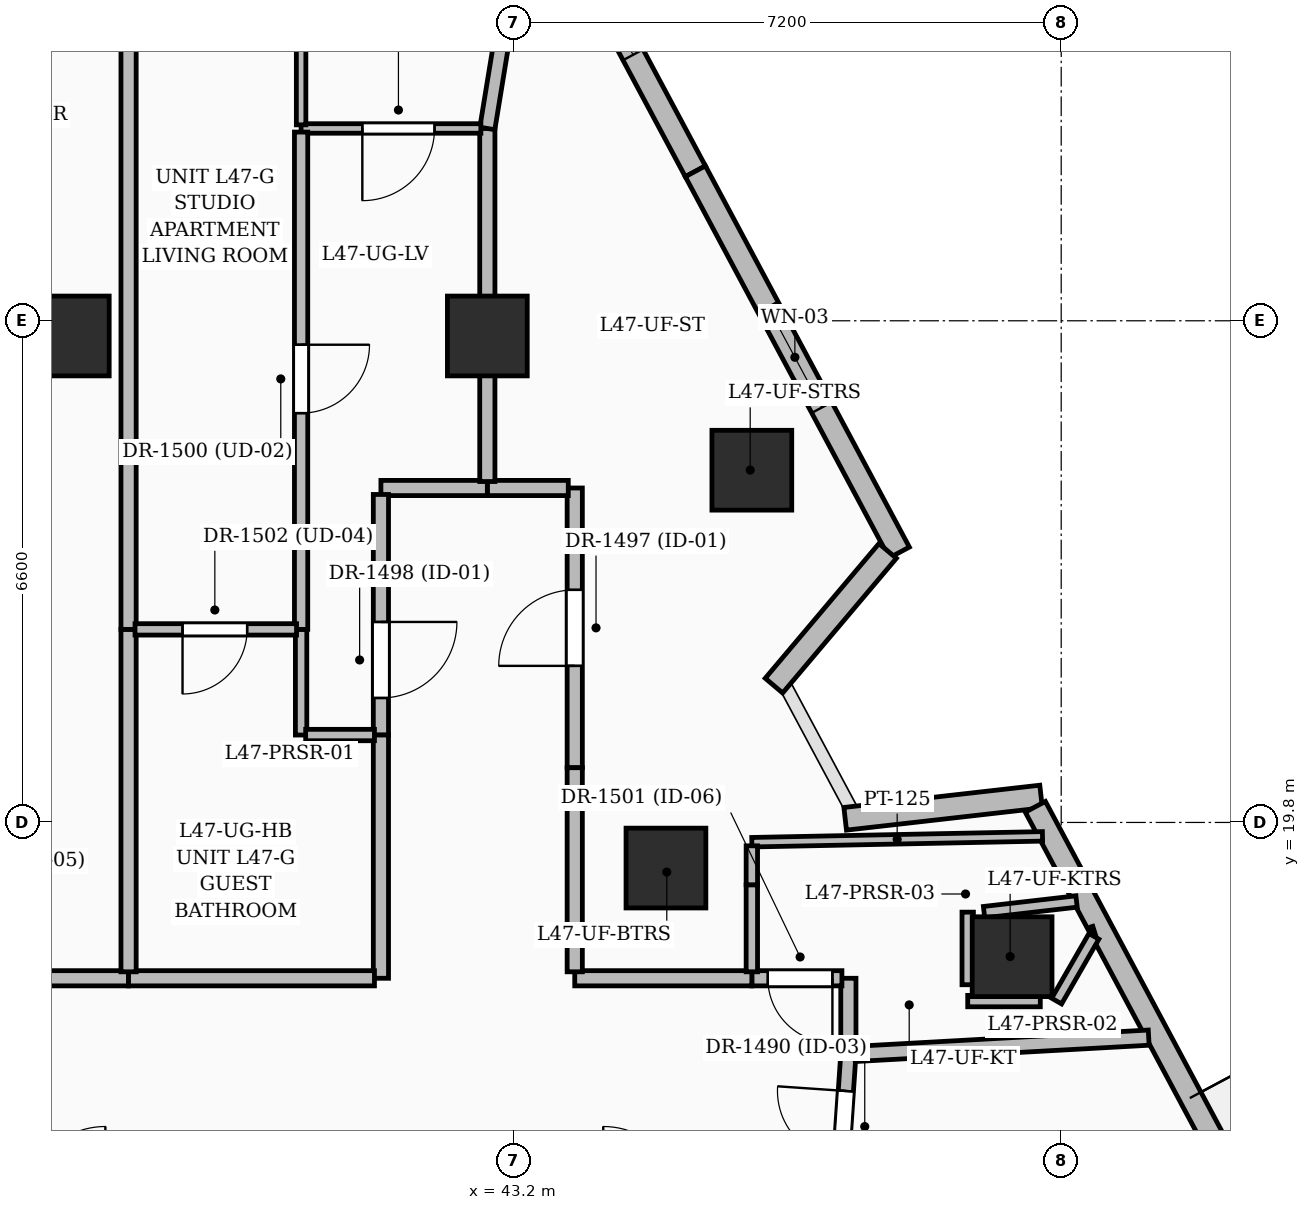
"""IFC4 building model, lengths in metres.
Left out: names, types, materials, properties, quantities, classifications, styles, units other than length and angle.
Written with IfcOpenShell. Run it as: python <this file> out.ifc"""

import sys

from ifc_helpers import new_model, si_unit, direction, frame, frame_2d, origin, origin_2d, place, context, subcontext, project, spatial, rectangle, extrude, element, fill, save


model = new_model("IFC4")
c1 = context("Model", 3, precision=1e-05, world=origin(), true_north=direction((0.0, 1.0)))
c2 = subcontext(c1, "Body", "Model", "MODEL_VIEW")
j1 = project(units=[si_unit("LENGTHUNIT", "METRE"), si_unit("PLANEANGLEUNIT", "RADIAN")], contexts=[c1])
p1 = place(None, origin())
s1 = spatial("IfcSite", under=j1, at=p1, CompositionType="ELEMENT")
p2 = place(p1, origin())
s2 = spatial("IfcBuilding", under=s1, at=p2, CompositionType="ELEMENT")
p3 = place(p2, frame((0.0, 0.0, 182.4)))
s3 = spatial("IfcBuildingStorey", under=s2, at=p3, CompositionType="ELEMENT", Elevation=182.4)
for number, where, z_axis, x_axis in (
    (1, (45.2, 19.2, 0.0), (0.0, 0.0, 1.0), (1.0, 0.0, 0.0)),
    (2, (42.85, 26.2, 0.0), (0.0, 0.0, 1.0), (1.0, 0.0, 0.0)),
    (3, (37.35, 26.2, 0.0), (0.0, 0.0, 1.0), (1.0, 0.0, 0.0)),
    (4, (49.754, 18.034, 0.0), (0.0, 0.0, 1.0), (1.0, 0.0, 0.0)),
    (5, (46.33, 24.434, 0.0), (0.0, 0.0, 1.0), (1.0, 0.0, 0.0)),
):
    element("IfcColumn", number, at=place(p3, frame(where, z_axis=z_axis, x_axis=x_axis)), inside=s3, PredefinedType="COLUMN", context=c2, shape_type="SweptSolid", body=[
        extrude(rectangle(XDim=1.05, YDim=1.05, at=origin_2d()), origin(), (0.0, 0.0, 1.0), 3.6),
    ])
p4 = place(p3, frame((42.904, 33.382, 0.0), z_axis=(0.0, 0.0, 1.0), x_axis=(0.4716995968, -0.881759315448, 0.0)))
e6 = element("IfcWall", 6, at=p4, inside=s3, PredefinedType="SOLIDWALL", context=c2, shape_type="SweptSolid", body=[
    extrude(rectangle(XDim=5.688, YDim=0.3, at=frame_2d((2.844, 0.0))), origin(), (0.0, 0.0, 1.0), 3.35),
])
p5 = place(p4, frame((2.35, 0.0, 0.55)))
e7 = element("IfcOpeningElement", 7, at=p5, cuts=e6, PredefinedType="OPENING", context=c2, shape_type="SweptSolid", body=[
    extrude(rectangle(XDim=1.6, YDim=2.2, at=frame_2d((0.8, 1.1))), frame((0.0, 0.16, 0.0), z_axis=(0.0, -1.0, 0.0), x_axis=(1.0, 0.0, 0.0)), (0.0, 0.0, 1.0), 0.32),
])
p6 = place(p3, frame((45.587, 28.366, 0.0), z_axis=(0.0, 0.0, 1.0), x_axis=(0.471750824323, -0.881731909228, 0.0)))
e8 = element("IfcWall", 8, at=p6, inside=s3, PredefinedType="SOLIDWALL", context=c2, shape_type="SweptSolid", body=[
    extrude(rectangle(XDim=5.688, YDim=0.3, at=frame_2d((2.844, 0.0))), origin(), (0.0, 0.0, 1.0), 3.35),
])
p7 = place(p6, frame((2.025, 0.0, 0.6)))
e9 = element("IfcOpeningElement", 9, at=p7, cuts=e8, PredefinedType="OPENING", context=c2, shape_type="SweptSolid", body=[
    extrude(rectangle(XDim=1.5, YDim=2.1, at=frame_2d((0.75, 1.05))), frame((0.0, 0.16, 0.0), z_axis=(0.0, -1.0, 0.0), x_axis=(1.0, 0.0, 0.0)), (0.0, 0.0, 1.0), 0.32),
])
p8 = place(p3, frame((48.117, 23.372, 0.0), z_axis=(0.0, 0.0, 1.0), x_axis=(-0.645234076177, -0.763984938949, 0.0)))
e10 = element("IfcWall", 10, at=p8, inside=s3, PredefinedType="SOLIDWALL", context=c2, shape_type="SweptSolid", body=[
    extrude(rectangle(XDim=2.319, YDim=0.3, at=frame_2d((1.16, 0.0))), origin(), (0.0, 0.0, 1.0), 2.575),
])
p9 = place(p3, frame((47.558, 19.848, 0.0), z_axis=(0.0, 0.0, 1.0), x_axis=(0.993611013473, 0.112859000109, 0.0)))
e11 = element("IfcWall", 11, at=p9, inside=s3, PredefinedType="SOLIDWALL", context=c2, shape_type="SweptSolid", body=[
    extrude(rectangle(XDim=2.594, YDim=0.3, at=frame_2d((1.297, 0.0))), origin(), (0.0, 0.0, 1.0), 2.575),
])
p10 = place(p3, frame((50.06, 20.006, 0.0), z_axis=(0.0, 0.0, 1.0), x_axis=(0.471725656125, -0.881745374444, 0.0)))
e12 = element("IfcWall", 12, at=p10, inside=s3, PredefinedType="SOLIDWALL", context=c2, shape_type="SweptSolid", body=[
    extrude(rectangle(XDim=5.413, YDim=0.3, at=frame_2d((2.706, 0.0))), origin(), (0.0, 0.0, 1.0), 3.35),
])
p11 = place(p3, frame((47.425, 14.2, 0.0), z_axis=(0.0, 0.0, 1.0), x_axis=(0.068484119878, 0.997652206595, 0.0)))
e13 = element("IfcWall", 13, at=p11, inside=s3, PredefinedType="PARTITIONING", context=c2, shape_type="SweptSolid", body=[
    extrude(rectangle(XDim=2.556, YDim=0.2, at=frame_2d((1.278, 0.0))), origin(), (0.0, 0.0, 1.0), 2.464),
])
p12 = place(p11, frame((1.172, 0.0, 0.0)))
e14 = element("IfcOpeningElement", 14, at=p12, cuts=e13, PredefinedType="OPENING", context=c2, shape_type="SweptSolid", body=[
    extrude(rectangle(XDim=0.9, YDim=2.1, at=frame_2d((0.45, 1.05))), frame((0.0, 0.11, 0.0), z_axis=(0.0, -1.0, 0.0), x_axis=(1.0, 0.0, 0.0)), (0.0, 0.0, 1.0), 0.22),
])
p13 = place(p3, frame((38.13, 17.75, 0.0), z_axis=(0.0, 0.0, 1.0), x_axis=(-1.0, 0.0, 0.0)))
e15 = element("IfcWall", 15, at=p13, inside=s3, PredefinedType="PARTITIONING", context=c2, shape_type="SweptSolid", body=[
    extrude(rectangle(XDim=4.73, YDim=0.2, at=frame_2d((2.365, 0.0))), origin(), (0.0, 0.0, 1.0), 2.436),
])
p14 = place(p13, frame((1.565, 0.0, 0.0)))
e16 = element("IfcOpeningElement", 16, at=p14, cuts=e15, PredefinedType="OPENING", context=c2, shape_type="SweptSolid", body=[
    extrude(rectangle(XDim=1.6, YDim=2.3, at=frame_2d((0.8, 1.15))), frame((0.0, 0.11, 0.0), z_axis=(0.0, -1.0, 0.0), x_axis=(1.0, 0.0, 0.0)), (0.0, 0.0, 1.0), 0.22),
])
p15 = place(p3, frame((44.0, 20.52, 0.0), z_axis=(0.0, 0.0, 1.0), x_axis=(0.0, 1.0, 0.0)))
e17 = element("IfcWall", 17, at=p15, inside=s3, PredefinedType="PARTITIONING", context=c2, shape_type="SweptSolid", body=[
    extrude(rectangle(XDim=3.68, YDim=0.2, at=frame_2d((1.84, 0.0))), origin(), (0.0, 0.0, 1.0), 2.436),
])
p16 = place(p15, frame((1.34, 0.0, 0.0)))
e18 = element("IfcOpeningElement", 18, at=p16, cuts=e17, PredefinedType="OPENING", context=c2, shape_type="SweptSolid", body=[
    extrude(rectangle(XDim=1.0, YDim=2.2, at=frame_2d((0.5, 1.1))), frame((0.0, 0.11, 0.0), z_axis=(0.0, -1.0, 0.0), x_axis=(1.0, 0.0, 0.0)), (0.0, 0.0, 1.0), 0.22),
])
p17 = place(p3, frame((43.915, 24.2, 0.0), z_axis=(0.0, 0.0, 1.0), x_axis=(-1.0, 0.0, 0.0)))
e19 = element("IfcWall", 19, at=p17, inside=s3, PredefinedType="PARTITIONING", context=c2, shape_type="SweptSolid", body=[
    extrude(rectangle(XDim=1.065, YDim=0.2, at=frame_2d((0.532, 0.0))), origin(), (0.0, 0.0, 1.0), 2.436),
])
p18 = place(p3, frame((47.6, 16.75, 0.0), z_axis=(0.0, 0.0, 1.0), x_axis=(0.0, 1.0, 0.0)))
e20 = element("IfcWall", 20, at=p18, inside=s3, PredefinedType="PARTITIONING", context=c2, shape_type="SweptSolid", body=[
    extrude(rectangle(XDim=1.0, YDim=0.2, at=frame_2d((0.5, 0.0))), origin(), (0.0, 0.0, 1.0), 3.01),
])
p19 = place(p3, frame((47.515, 17.75, 0.0), z_axis=(0.0, 0.0, 1.0), x_axis=(-1.0, 0.0, 0.0)))
e21 = element("IfcWall", 21, at=p19, inside=s3, PredefinedType="PARTITIONING", context=c2, shape_type="SweptSolid", body=[
    extrude(rectangle(XDim=1.185, YDim=0.2, at=frame_2d((0.592, 0.0))), origin(), (0.0, 0.0, 1.0), 3.01),
])
p20 = place(p19, frame((0.125, 0.0, 0.0)))
e22 = element("IfcOpeningElement", 22, at=p20, cuts=e21, PredefinedType="OPENING", context=c2, shape_type="SweptSolid", body=[
    extrude(rectangle(XDim=0.85, YDim=2.1, at=frame_2d((0.425, 1.05))), frame((0.0, 0.11, 0.0), z_axis=(0.0, -1.0, 0.0), x_axis=(1.0, 0.0, 0.0)), (0.0, 0.0, 1.0), 0.22),
])
p21 = place(p3, frame((46.33, 17.75, 0.0), z_axis=(0.0, 0.0, 1.0), x_axis=(-1.0, 0.0, 0.0)))
e23 = element("IfcWall", 23, at=p21, inside=s3, PredefinedType="PARTITIONING", context=c2, shape_type="SweptSolid", body=[
    extrude(rectangle(XDim=2.33, YDim=0.2, at=frame_2d((1.165, 0.0))), origin(), (0.0, 0.0, 1.0), 2.436),
])
p22 = place(p3, frame((42.85, 24.2, 0.0), z_axis=(0.0, 0.0, 1.0), x_axis=(-1.0, 0.0, 0.0)))
e24 = element("IfcWall", 24, at=p22, inside=s3, PredefinedType="PARTITIONING", context=c2, shape_type="SweptSolid", body=[
    extrude(rectangle(XDim=1.4, YDim=0.2, at=frame_2d((0.7, 0.0))), origin(), (0.0, 0.0, 1.0), 3.35),
])
p23 = place(p3, frame((41.45, 24.115, 0.0), z_axis=(0.0, 0.0, 1.0), x_axis=(0.0, -1.0, 0.0)))
e25 = element("IfcWall", 25, at=p23, inside=s3, PredefinedType="PARTITIONING", context=c2, shape_type="SweptSolid", body=[
    extrude(rectangle(XDim=3.165, YDim=0.2, at=frame_2d((1.583, 0.0))), origin(), (0.0, 0.0, 1.0), 3.35),
])
p24 = place(p23, frame((1.677, 0.0, 0.0)))
e26 = element("IfcOpeningElement", 26, at=p24, cuts=e25, PredefinedType="OPENING", context=c2, shape_type="SweptSolid", body=[
    extrude(rectangle(XDim=1.0, YDim=2.2, at=frame_2d((0.5, 1.1))), frame((0.0, 0.11, 0.0), z_axis=(0.0, -1.0, 0.0), x_axis=(1.0, 0.0, 0.0)), (0.0, 0.0, 1.0), 0.22),
])
p25 = place(p3, frame((41.45, 20.95, 0.0), z_axis=(0.0, 0.0, 1.0), x_axis=(0.0, -1.0, 0.0)))
e27 = element("IfcWall", 27, at=p25, inside=s3, PredefinedType="PARTITIONING", context=c2, shape_type="SweptSolid", body=[
    extrude(rectangle(XDim=3.2, YDim=0.2, at=frame_2d((1.6, 0.0))), origin(), (0.0, 0.0, 1.0), 3.35),
])
p26 = place(p3, frame((41.365, 17.75, 0.0), z_axis=(0.0, 0.0, 1.0), x_axis=(-1.0, 0.0, 0.0)))
e28 = element("IfcWall", 28, at=p26, inside=s3, PredefinedType="PARTITIONING", context=c2, shape_type="SweptSolid", body=[
    extrude(rectangle(XDim=3.235, YDim=0.2, at=frame_2d((1.618, 0.0))), origin(), (0.0, 0.0, 1.0), 3.35),
])
p27 = place(p3, frame((51.551, 16.969, 0.0), z_axis=(0.0, 0.0, 1.0), x_axis=(-0.998463068017, -0.055421131396, 0.0)))
e29 = element("IfcWall", 29, at=p27, inside=s3, PredefinedType="PARTITIONING", context=c2, shape_type="SweptSolid", body=[
    extrude(rectangle(XDim=3.872, YDim=0.2, at=frame_2d((1.936, 0.0))), origin(), (0.0, 0.0, 1.0), 2.464),
])
p28 = place(p3, frame((38.13, 17.835, 0.0), z_axis=(0.0, 0.0, 1.0), x_axis=(0.0, 1.0, 0.0)))
e30 = element("IfcWall", 30, at=p28, inside=s3, PredefinedType="PARTITIONING", context=c2, shape_type="SweptSolid", body=[
    extrude(rectangle(XDim=4.505, YDim=0.2, at=frame_2d((2.252, 0.0))), origin(), (0.0, 0.0, 1.0), 3.35),
])
p29 = place(p3, frame((38.13, 22.34, 0.0), z_axis=(0.0, 0.0, 1.0), x_axis=(0.0, 1.0, 0.0)))
e31 = element("IfcWall", 31, at=p29, inside=s3, PredefinedType="PARTITIONING", context=c2, shape_type="SweptSolid", body=[
    extrude(rectangle(XDim=11.59, YDim=0.2, at=frame_2d((5.795, 0.0))), origin(), (0.0, 0.0, 1.0), 2.436),
])
p30 = place(p3, frame((46.33, 19.54, 0.0), z_axis=(0.0, 0.0, 1.0), x_axis=(0.999797833356, 0.020107024038, 0.0)))
e32 = element("IfcWall", 32, at=p30, inside=s3, PredefinedType="PARTITIONING", context=c2, shape_type="SweptSolid", body=[
    extrude(rectangle(XDim=3.825, YDim=0.125, at=frame_2d((1.912, 0.0))), origin(), (0.0, 0.0, 1.0), 2.57),
])
p31 = place(p3, frame((42.85, 28.93, 0.0), z_axis=(0.0, 0.0, 1.0), x_axis=(0.0, -1.0, 0.0)))
e33 = element("IfcWall", 33, at=p31, inside=s3, PredefinedType="PARTITIONING", context=c2, shape_type="SweptSolid", body=[
    extrude(rectangle(XDim=4.645, YDim=0.2, at=frame_2d((2.323, 0.0))), origin(), (0.0, 0.0, 1.0), 2.436),
])
p32 = place(p3, frame((43.382, 32.181, 0.0), z_axis=(0.0, 0.0, 1.0), x_axis=(-0.161489880459, -0.986874368149, 0.0)))
e34 = element("IfcWall", 34, at=p32, inside=s3, PredefinedType="PARTITIONING", context=c2, shape_type="SweptSolid", body=[
    extrude(rectangle(XDim=3.294, YDim=0.2, at=frame_2d((1.647, 0.0))), origin(), (0.0, 0.0, 1.0), 2.57),
])
p33 = place(p3, frame((46.33, 18.98, 0.0), z_axis=(0.0, 0.0, 1.0), x_axis=(0.0, -1.0, 0.0)))
e35 = element("IfcWall", 35, at=p33, inside=s3, PredefinedType="PARTITIONING", context=c2, shape_type="SweptSolid", body=[
    extrude(rectangle(XDim=1.145, YDim=0.15, at=frame_2d((0.573, 0.0))), origin(), (0.0, 0.0, 1.0), 3.01),
])
p34 = place(p3, frame((40.4, 22.34, 0.0), z_axis=(0.0, 0.0, 1.0), x_axis=(0.0, -1.0, 0.0)))
e36 = element("IfcWall", 36, at=p34, inside=s3, PredefinedType="PARTITIONING", context=c2, shape_type="SweptSolid", body=[
    extrude(rectangle(XDim=1.39, YDim=0.15, at=frame_2d((0.695, 0.0))), origin(), (0.0, 0.0, 1.0), 3.35),
])
p35 = place(p3, frame((40.46, 20.95, 0.0), z_axis=(0.0, 0.0, 1.0), x_axis=(1.0, 0.0, 0.0)))
e37 = element("IfcWall", 37, at=p35, inside=s3, PredefinedType="PARTITIONING", context=c2, shape_type="SweptSolid", body=[
    extrude(rectangle(XDim=0.905, YDim=0.15, at=frame_2d((0.453, 0.0))), origin(), (0.0, 0.0, 1.0), 3.35),
])
p36 = place(p3, frame((42.765, 28.93, 0.0), z_axis=(0.0, 0.0, 1.0), x_axis=(-1.0, 0.0, 0.0)))
e38 = element("IfcWall", 38, at=p36, inside=s3, PredefinedType="PARTITIONING", context=c2, shape_type="SweptSolid", body=[
    extrude(rectangle(XDim=2.365, YDim=0.125, at=frame_2d((1.183, 0.0))), origin(), (0.0, 0.0, 1.0), 2.464),
])
p37 = place(p36, frame((0.61, 0.0, 0.0)))
e39 = element("IfcOpeningElement", 39, at=p37, cuts=e38, PredefinedType="OPENING", context=c2, shape_type="SweptSolid", body=[
    extrude(rectangle(XDim=0.95, YDim=2.2, at=frame_2d((0.475, 1.1))), frame((0.0, 0.072, 0.0), z_axis=(0.0, -1.0, 0.0), x_axis=(1.0, 0.0, 0.0)), (0.0, 0.0, 1.0), 0.145),
])
p38 = place(p3, frame((40.4, 28.883, 0.0), z_axis=(0.0, 0.0, 1.0), x_axis=(0.0, -1.0, 0.0)))
e40 = element("IfcWall", 40, at=p38, inside=s3, PredefinedType="PARTITIONING", context=c2, shape_type="SweptSolid", body=[
    extrude(rectangle(XDim=6.542, YDim=0.175, at=frame_2d((3.271, 0.0))), origin(), (0.0, 0.0, 1.0), 2.436),
])
p39 = place(p38, frame((2.798, 0.0, 0.0)))
e41 = element("IfcOpeningElement", 41, at=p39, cuts=e40, PredefinedType="OPENING", context=c2, shape_type="SweptSolid", body=[
    extrude(rectangle(XDim=0.9, YDim=2.15, at=frame_2d((0.45, 1.075))), frame((0.0, 0.097, 0.0), z_axis=(0.0, -1.0, 0.0), x_axis=(1.0, 0.0, 0.0)), (0.0, 0.0, 1.0), 0.195),
])
p40 = place(p3, frame((40.34, 22.34, 0.0), z_axis=(0.0, 0.0, 1.0), x_axis=(-1.0, 0.0, 0.0)))
e42 = element("IfcWall", 42, at=p40, inside=s3, PredefinedType="PARTITIONING", context=c2, shape_type="SweptSolid", body=[
    extrude(rectangle(XDim=2.125, YDim=0.15, at=frame_2d((1.062, 0.0))), origin(), (0.0, 0.0, 1.0), 3.35),
])
p41 = place(p40, frame((0.65, 0.0, 0.0)))
e43 = element("IfcOpeningElement", 43, at=p41, cuts=e42, PredefinedType="OPENING", context=c2, shape_type="SweptSolid", body=[
    extrude(rectangle(XDim=0.85, YDim=2.1, at=frame_2d((0.425, 1.05))), frame((0.0, 0.085, 0.0), z_axis=(0.0, -1.0, 0.0), x_axis=(1.0, 0.0, 0.0)), (0.0, 0.0, 1.0), 0.17),
])
p42 = place(p3, frame((40.4, 33.883, 0.0), z_axis=(0.0, 0.0, 1.0), x_axis=(0.0, -1.0, 0.0)))
e44 = element("IfcWall", 44, at=p42, inside=s3, PredefinedType="PARTITIONING", context=c2, shape_type="SweptSolid", body=[
    extrude(rectangle(XDim=4.905, YDim=0.125, at=frame_2d((2.453, 0.0))), origin(), (0.0, 0.0, 1.0), 2.57),
])
p43 = place(p3, frame((44.0, 17.835, 0.0), z_axis=(0.0, 0.0, 1.0), x_axis=(0.0, 1.0, 0.0)))
e45 = element("IfcWall", 45, at=p43, inside=s3, PredefinedType="PARTITIONING", context=c2, shape_type="SweptSolid", body=[
    extrude(rectangle(XDim=2.685, YDim=0.2, at=frame_2d((1.343, 0.0))), origin(), (0.0, 0.0, 1.0), 3.35),
])
p44 = place(p3, frame((50.838, 18.362, 0.0), z_axis=(0.0, 0.0, 1.0), x_axis=(-0.95112480189, -0.30880675386, 0.0)))
e46 = element("IfcWall", 46, at=p44, inside=s3, PredefinedType="PARTITIONING", context=c2, shape_type="SweptSolid", body=[
    extrude(rectangle(XDim=0.02, YDim=0.15, at=frame_2d((0.01, 0.0))), origin(), (0.0, 0.0, 1.0), 3.35),
])
p45 = place(p3, frame((50.83, 18.302, 0.0), z_axis=(0.0, 0.0, 1.0), x_axis=(-0.498517791367, -0.866879467798, 0.0)))
e47 = element("IfcWall", 47, at=p45, inside=s3, PredefinedType="PARTITIONING", context=c2, shape_type="SweptSolid", body=[
    extrude(rectangle(XDim=0.983, YDim=0.15, at=frame_2d((0.491, 0.0))), origin(), (0.0, 0.0, 1.0), 2.57),
])
for number, where, z_axis, x_axis in (
    (48, (50.125, 17.45, 0.0), (0.0, 0.0, 1.0), (-1.0, 0.0, 0.0)),
    (49, (49.17, 17.665, 0.0), (0.0, 0.0, 1.0), (0.0, 1.0, 0.0)),
):
    element("IfcWall", number, at=place(p3, frame(where, z_axis=z_axis, x_axis=x_axis)), inside=s3, PredefinedType="PARTITIONING", context=c2, shape_type="SweptSolid", body=[
        extrude(rectangle(XDim=0.955, YDim=0.15, at=frame_2d((0.478, 0.0))), origin(), (0.0, 0.0, 1.0), 2.464),
    ])
p46 = place(p3, frame((49.385, 18.62, 0.0), z_axis=(0.0, 0.0, 1.0), x_axis=(0.993458591967, 0.11419293344, 0.0)))
e50 = element("IfcWall", 50, at=p46, inside=s3, PredefinedType="PARTITIONING", context=c2, shape_type="SweptSolid", body=[
    extrude(rectangle(XDim=1.225, YDim=0.15, at=frame_2d((0.613, 0.0))), origin(), (0.0, 0.0, 1.0), 2.57),
])
p47 = place(p3, frame((46.33, 19.492, 0.0), z_axis=(0.0, 0.0, 1.0), x_axis=(0.0, -1.0, 0.0)))
e51 = element("IfcWall", 51, at=p47, inside=s3, PredefinedType="PARTITIONING", context=c2, shape_type="SweptSolid", body=[
    extrude(rectangle(XDim=0.512, YDim=0.15, at=frame_2d((0.256, 0.0))), origin(), (0.0, 0.0, 1.0), 3.01),
])
p48 = place(p5, origin())
e52 = element("IfcWindow", 52, at=p48, inside=s3, PartitioningType="SINGLE_PANEL", PredefinedType="WINDOW", context=c2, shape_type="SweptSolid", body=[
    extrude(rectangle(XDim=1.6, YDim=2.2, at=frame_2d((0.8, 1.1))), frame((0.0, 0.03, 0.0), z_axis=(0.0, -1.0, 0.0), x_axis=(1.0, 0.0, 0.0)), (0.0, 0.0, 1.0), 0.06),
])
fill(e7, e52)
p49 = place(p7, origin())
e53 = element("IfcWindow", 53, at=p49, inside=s3, PartitioningType="SINGLE_PANEL", PredefinedType="WINDOW", context=c2, shape_type="SweptSolid", body=[
    extrude(rectangle(XDim=1.5, YDim=2.1, at=frame_2d((0.75, 1.05))), frame((0.0, 0.03, 0.0), z_axis=(0.0, -1.0, 0.0), x_axis=(1.0, 0.0, 0.0)), (0.0, 0.0, 1.0), 0.06),
])
fill(e9, e53)
p50 = place(p12, origin())
e54 = element("IfcDoor", 54, at=p50, inside=s3, OperationType="SINGLE_SWING_RIGHT", PredefinedType="DOOR", context=c2, shape_type="SweptSolid", body=[
    extrude(rectangle(XDim=0.9, YDim=2.1, at=frame_2d((0.45, 1.05))), frame((0.0, 0.025, 0.0), z_axis=(0.0, -1.0, 0.0), x_axis=(1.0, 0.0, 0.0)), (0.0, 0.0, 1.0), 0.05),
])
fill(e14, e54)
p51 = place(p16, origin())
e55 = element("IfcDoor", 55, at=p51, inside=s3, OperationType="SINGLE_SWING_LEFT", PredefinedType="DOOR", context=c2, shape_type="SweptSolid", body=[
    extrude(rectangle(XDim=1.0, YDim=2.2, at=frame_2d((0.5, 1.1))), frame((0.0, 0.025, 0.0), z_axis=(0.0, -1.0, 0.0), x_axis=(1.0, 0.0, 0.0)), (0.0, 0.0, 1.0), 0.05),
])
fill(e18, e55)
p52 = place(p24, origin())
e56 = element("IfcDoor", 56, at=p52, inside=s3, OperationType="SINGLE_SWING_LEFT", PredefinedType="DOOR", context=c2, shape_type="SweptSolid", body=[
    extrude(rectangle(XDim=1.0, YDim=2.2, at=frame_2d((0.5, 1.1))), frame((0.0, 0.025, 0.0), z_axis=(0.0, -1.0, 0.0), x_axis=(1.0, 0.0, 0.0)), (0.0, 0.0, 1.0), 0.05),
])
fill(e26, e56)
p53 = place(p37, origin())
e57 = element("IfcDoor", 57, at=p53, inside=s3, OperationType="SINGLE_SWING_RIGHT", PredefinedType="DOOR", context=c2, shape_type="SweptSolid", body=[
    extrude(rectangle(XDim=0.95, YDim=2.2, at=frame_2d((0.475, 1.1))), frame((0.0, 0.025, 0.0), z_axis=(0.0, -1.0, 0.0), x_axis=(1.0, 0.0, 0.0)), (0.0, 0.0, 1.0), 0.05),
])
fill(e39, e57)
p54 = place(p39, origin())
e58 = element("IfcDoor", 58, at=p54, inside=s3, OperationType="SINGLE_SWING_LEFT", PredefinedType="DOOR", context=c2, shape_type="SweptSolid", body=[
    extrude(rectangle(XDim=0.9, YDim=2.15, at=frame_2d((0.45, 1.075))), frame((0.0, 0.025, 0.0), z_axis=(0.0, -1.0, 0.0), x_axis=(1.0, 0.0, 0.0)), (0.0, 0.0, 1.0), 0.05),
])
fill(e41, e58)
p55 = place(p20, origin())
e59 = element("IfcDoor", 59, at=p55, inside=s3, OperationType="SINGLE_SWING_LEFT", PredefinedType="DOOR", context=c2, shape_type="SweptSolid", body=[
    extrude(rectangle(XDim=0.85, YDim=2.1, at=frame_2d((0.425, 1.05))), frame((0.0, 0.025, 0.0), z_axis=(0.0, -1.0, 0.0), x_axis=(1.0, 0.0, 0.0)), (0.0, 0.0, 1.0), 0.05),
])
fill(e22, e59)
p56 = place(p41, origin())
e60 = element("IfcDoor", 60, at=p56, inside=s3, OperationType="SINGLE_SWING_RIGHT", PredefinedType="DOOR", context=c2, shape_type="SweptSolid", body=[
    extrude(rectangle(XDim=0.85, YDim=2.1, at=frame_2d((0.425, 1.05))), frame((0.0, 0.025, 0.0), z_axis=(0.0, -1.0, 0.0), x_axis=(1.0, 0.0, 0.0)), (0.0, 0.0, 1.0), 0.05),
])
fill(e43, e60)
save(model, sys.argv[1])
